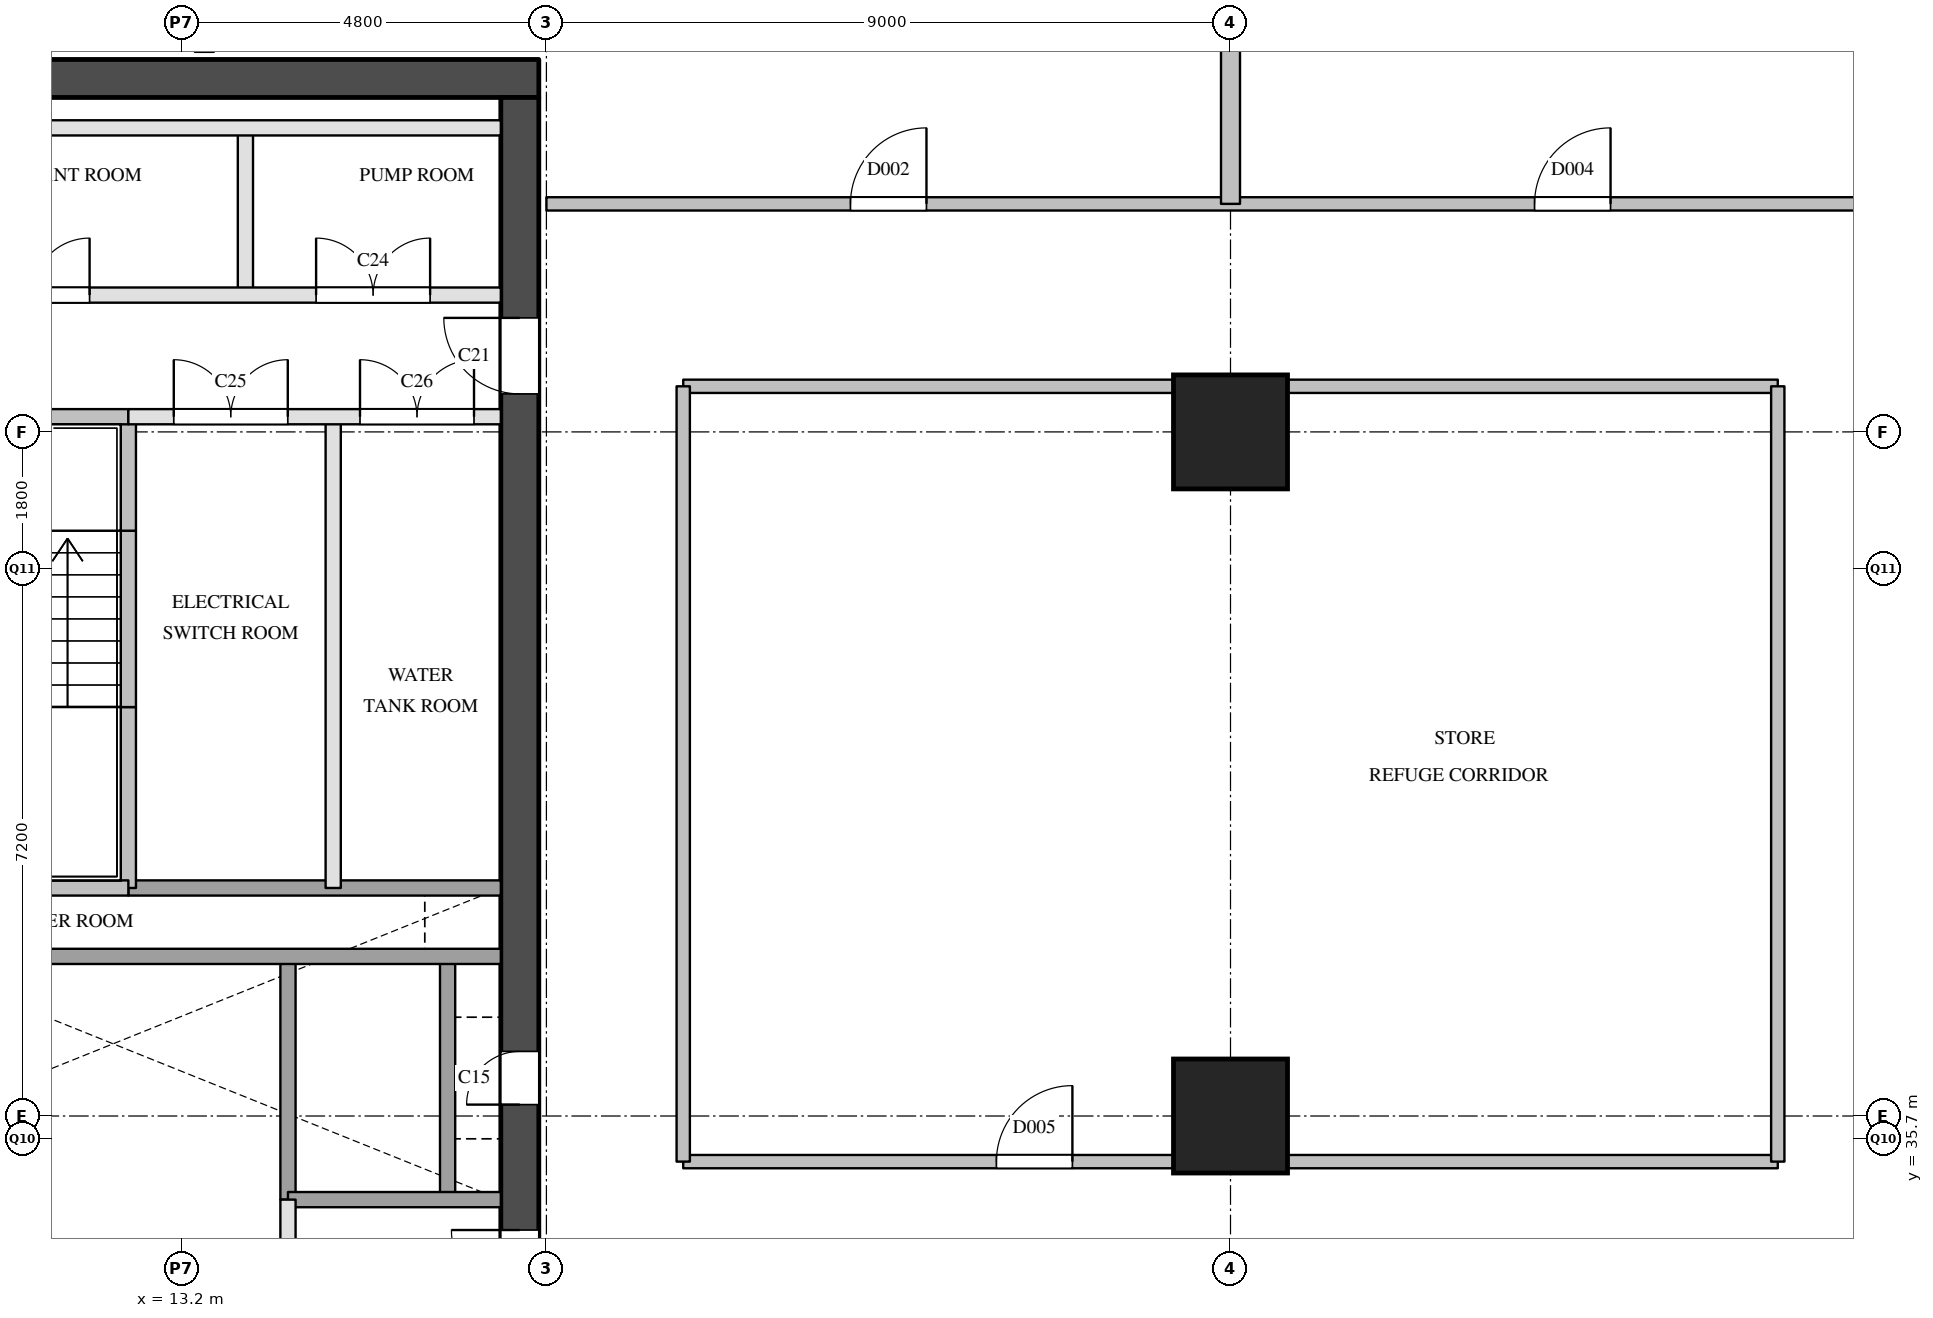
"""IFC4 building model, lengths in metres.
Left out: names, types, materials, properties, quantities, classifications, styles, units other than length and angle.
Written with IfcOpenShell. Run it as: python <this file> out.ifc"""

import sys

from ifc_helpers import new_model, si_unit, direction, frame, frame_2d, origin, origin_2d, place, context, subcontext, project, spatial, rectangle, extrude, element, fill, save


model = new_model("IFC4")
c1 = context("Model", 3, precision=1e-05, world=origin(), true_north=direction((0.0, 1.0)))
c2 = subcontext(c1, "Body", "Model", "MODEL_VIEW")
j1 = project(units=[si_unit("LENGTHUNIT", "METRE"), si_unit("PLANEANGLEUNIT", "RADIAN")], contexts=[c1])
p1 = place(None, origin())
s1 = spatial("IfcSite", under=j1, at=p1, CompositionType="ELEMENT")
p2 = place(p1, origin())
s2 = spatial("IfcBuilding", under=s1, at=p2, CompositionType="ELEMENT")
p3 = place(p2, frame((0.0, 0.0, 197.3)))
s3 = spatial("IfcBuildingStorey", under=s2, at=p3, CompositionType="ELEMENT", Elevation=197.3)
for number, where, z_axis, x_axis in (
    (1, (27.0, 36.0, 0.0), (0.0, 0.0, 1.0), (1.0, 0.0, 0.0)),
    (2, (27.0, 45.0, 0.0), (0.0, 0.0, 1.0), (1.0, 0.0, 0.0)),
):
    element("IfcColumn", number, at=place(p3, frame(where, z_axis=z_axis, x_axis=x_axis)), inside=s3, PredefinedType="COLUMN", context=c2, shape_type="SweptSolid", body=[
        extrude(rectangle(XDim=1.5, YDim=1.5, at=origin_2d()), origin(), (0.0, 0.0, 1.0), 6.0),
    ])
p4 = place(p3, frame((5.7, 49.65, 0.0), z_axis=(0.0, 0.0, 1.0), x_axis=(1.0, 0.0, 0.0)))
e3 = element("IfcWall", 3, at=p4, inside=s3, PredefinedType="SHEAR", context=c2, shape_type="SweptSolid", body=[
    extrude(rectangle(XDim=12.2, YDim=0.5, at=frame_2d((6.1, 0.0))), origin(), (0.0, 0.0, 1.0), 5.7),
])
p5 = place(p3, frame((17.65, 29.1, 0.0), z_axis=(0.0, 0.0, 1.0), x_axis=(0.0, 1.0, 0.0)))
e4 = element("IfcWall", 4, at=p5, inside=s3, PredefinedType="SHEAR", context=c2, shape_type="SweptSolid", body=[
    extrude(rectangle(XDim=20.3, YDim=0.5, at=frame_2d((10.15, 0.0))), origin(), (0.0, 0.0, 1.0), 5.7),
])
p6 = place(p5, frame((1.25, 0.0, 0.0)))
e5 = element("IfcOpeningElement", 5, at=p6, cuts=e4, PredefinedType="OPENING", context=c2, shape_type="SweptSolid", body=[
    extrude(rectangle(XDim=0.7, YDim=2.1, at=frame_2d((0.35, 1.05))), frame((0.0, 0.26, 0.0), z_axis=(0.0, -1.0, 0.0), x_axis=(1.0, 0.0, 0.0)), (0.0, 0.0, 1.0), 0.52),
])
p7 = place(p5, frame((7.05, 0.0, 0.0)))
e6 = element("IfcOpeningElement", 6, at=p7, cuts=e4, PredefinedType="OPENING", context=c2, shape_type="SweptSolid", body=[
    extrude(rectangle(XDim=0.7, YDim=2.1, at=frame_2d((0.35, 1.05))), frame((0.0, 0.26, 0.0), z_axis=(0.0, -1.0, 0.0), x_axis=(1.0, 0.0, 0.0)), (0.0, 0.0, 1.0), 0.52),
])
p8 = place(p5, frame((3.6, 0.0, 0.0)))
e7 = element("IfcOpeningElement", 7, at=p8, cuts=e4, PredefinedType="OPENING", context=c2, shape_type="SweptSolid", body=[
    extrude(rectangle(XDim=1.8, YDim=2.1, at=frame_2d((0.9, 1.05))), frame((0.0, 0.26, 0.0), z_axis=(0.0, -1.0, 0.0), x_axis=(1.0, 0.0, 0.0)), (0.0, 0.0, 1.0), 0.52),
])
p9 = place(p5, frame((16.4, 0.0, 0.0)))
e8 = element("IfcOpeningElement", 8, at=p9, cuts=e4, PredefinedType="OPENING", context=c2, shape_type="SweptSolid", body=[
    extrude(rectangle(XDim=1.0, YDim=2.1, at=frame_2d((0.5, 1.05))), frame((0.0, 0.26, 0.0), z_axis=(0.0, -1.0, 0.0), x_axis=(1.0, 0.0, 0.0)), (0.0, 0.0, 1.0), 0.52),
])
p10 = place(p3, frame((12.5, 39.0, 0.0), z_axis=(0.0, 0.0, 1.0), x_axis=(0.0, 1.0, 0.0)))
e9 = element("IfcWall", 9, at=p10, inside=s3, PredefinedType="SOLIDWALL", context=c2, shape_type="SweptSolid", body=[
    extrude(rectangle(XDim=2.38, YDim=0.2, at=frame_2d((1.19, 0.0))), origin(), (0.0, 0.0, 1.0), 5.7),
])
p11 = place(p3, frame((12.5, 41.38, 0.0), z_axis=(0.0, 0.0, 1.0), x_axis=(0.0, 1.0, 0.0)))
e10 = element("IfcWall", 10, at=p11, inside=s3, PredefinedType="SOLIDWALL", context=c2, shape_type="SweptSolid", body=[
    extrude(rectangle(XDim=2.32, YDim=0.2, at=frame_2d((1.16, 0.0))), origin(), (0.0, 0.0, 1.0), 5.7),
])
p12 = place(p3, frame((12.5, 43.7, 0.0), z_axis=(0.0, 0.0, 1.0), x_axis=(0.0, 1.0, 0.0)))
e11 = element("IfcWall", 11, at=p12, inside=s3, PredefinedType="SOLIDWALL", context=c2, shape_type="SweptSolid", body=[
    extrude(rectangle(XDim=1.5, YDim=0.2, at=frame_2d((0.75, 0.0))), origin(), (0.0, 0.0, 1.0), 5.7),
])
p13 = place(p3, frame((14.04, 46.8, 0.0), z_axis=(0.0, 0.0, 1.0), x_axis=(0.0, 1.0, 0.0)))
e12 = element("IfcWall", 12, at=p13, inside=s3, PredefinedType="PARTITIONING", context=c2, shape_type="SweptSolid", body=[
    extrude(rectangle(XDim=2.2, YDim=0.2, at=frame_2d((1.1, 0.0))), origin(), (0.0, 0.0, 1.0), 5.7),
])
p14 = place(p3, frame((14.6, 32.3, 0.0), z_axis=(0.0, 0.0, 1.0), x_axis=(0.0, 1.0, 0.0)))
e13 = element("IfcWall", 13, at=p14, inside=s3, PredefinedType="PARTITIONING", context=c2, shape_type="SweptSolid", body=[
    extrude(rectangle(XDim=2.6, YDim=0.2, at=frame_2d((1.3, 0.0))), origin(), (0.0, 0.0, 1.0), 5.7),
])
p15 = place(p14, frame((0.25, 0.0, 0.0)))
e14 = element("IfcOpeningElement", 14, at=p15, cuts=e13, PredefinedType="OPENING", context=c2, shape_type="SweptSolid", body=[
    extrude(rectangle(XDim=1.0, YDim=2.1, at=frame_2d((0.5, 1.05))), frame((0.0, 0.11, 0.0), z_axis=(0.0, -1.0, 0.0), x_axis=(1.0, 0.0, 0.0)), (0.0, 0.0, 1.0), 0.22),
])
p16 = place(p3, frame((14.6, 34.9, 0.0), z_axis=(0.0, 0.0, 1.0), x_axis=(0.0, 1.0, 0.0)))
e15 = element("IfcWall", 15, at=p16, inside=s3, PredefinedType="SOLIDWALL", context=c2, shape_type="SweptSolid", body=[
    extrude(rectangle(XDim=3.2, YDim=0.2, at=frame_2d((1.6, 0.0))), origin(), (0.0, 0.0, 1.0), 5.7),
])
p17 = place(p3, frame((15.195, 39.0, 0.0), z_axis=(0.0, 0.0, 1.0), x_axis=(0.0, 1.0, 0.0)))
e16 = element("IfcWall", 16, at=p17, inside=s3, PredefinedType="PARTITIONING", context=c2, shape_type="SweptSolid", body=[
    extrude(rectangle(XDim=6.2, YDim=0.2, at=frame_2d((3.1, 0.0))), origin(), (0.0, 0.0, 1.0), 5.7),
])
p18 = place(p3, frame((16.7, 34.9, 0.0), z_axis=(0.0, 0.0, 1.0), x_axis=(0.0, 1.0, 0.0)))
e17 = element("IfcWall", 17, at=p18, inside=s3, PredefinedType="SOLIDWALL", context=c2, shape_type="SweptSolid", body=[
    extrude(rectangle(XDim=3.2, YDim=0.2, at=frame_2d((1.6, 0.0))), origin(), (0.0, 0.0, 1.0), 5.7),
])
p19 = place(p3, frame((14.6, 34.9, 0.0), z_axis=(0.0, 0.0, 1.0), x_axis=(1.0, 0.0, 0.0)))
e18 = element("IfcWall", 18, at=p19, inside=s3, PredefinedType="SOLIDWALL", context=c2, shape_type="SweptSolid", body=[
    extrude(rectangle(XDim=2.8, YDim=0.2, at=frame_2d((1.4, 0.0))), origin(), (0.0, 0.0, 1.0), 5.7),
])
p20 = place(p3, frame((6.2, 38.1, 0.0), z_axis=(0.0, 0.0, 1.0), x_axis=(1.0, 0.0, 0.0)))
e19 = element("IfcWall", 19, at=p20, inside=s3, PredefinedType="SOLIDWALL", context=c2, shape_type="SweptSolid", body=[
    extrude(rectangle(XDim=11.2, YDim=0.2, at=frame_2d((5.6, 0.0))), origin(), (0.0, 0.0, 1.0), 5.7),
])
p21 = place(p3, frame((12.5, 39.0, 0.0), z_axis=(0.0, 0.0, 1.0), x_axis=(1.0, 0.0, 0.0)))
e20 = element("IfcWall", 20, at=p21, inside=s3, PredefinedType="SOLIDWALL", context=c2, shape_type="SweptSolid", body=[
    extrude(rectangle(XDim=4.9, YDim=0.2, at=frame_2d((2.45, 0.0))), origin(), (0.0, 0.0, 1.0), 5.7),
])
p22 = place(p3, frame((9.45, 39.0, 0.0), z_axis=(0.0, 0.0, 1.0), x_axis=(1.0, 0.0, 0.0)))
e21 = element("IfcWall", 21, at=p22, inside=s3, PredefinedType="SOLIDWALL", context=c2, shape_type="SweptSolid", body=[
    extrude(rectangle(XDim=3.05, YDim=0.2, at=frame_2d((1.525, 0.0))), origin(), (0.0, 0.0, 1.0), 5.7),
])
p23 = place(p3, frame((12.5, 45.2, 0.0), z_axis=(0.0, 0.0, 1.0), x_axis=(1.0, 0.0, 0.0)))
e22 = element("IfcWall", 22, at=p23, inside=s3, PredefinedType="PARTITIONING", context=c2, shape_type="SweptSolid", body=[
    extrude(rectangle(XDim=4.9, YDim=0.2, at=frame_2d((2.45, 0.0))), origin(), (0.0, 0.0, 1.0), 5.7),
])
p24 = place(p23, frame((0.597, 0.0, 0.0)))
e23 = element("IfcOpeningElement", 23, at=p24, cuts=e22, PredefinedType="OPENING", context=c2, shape_type="SweptSolid", body=[
    extrude(rectangle(XDim=1.5, YDim=2.1, at=frame_2d((0.75, 1.05))), frame((0.0, 0.11, 0.0), z_axis=(0.0, -1.0, 0.0), x_axis=(1.0, 0.0, 0.0)), (0.0, 0.0, 1.0), 0.22),
])
p25 = place(p23, frame((3.048, 0.0, 0.0)))
e24 = element("IfcOpeningElement", 24, at=p25, cuts=e22, PredefinedType="OPENING", context=c2, shape_type="SweptSolid", body=[
    extrude(rectangle(XDim=1.5, YDim=2.1, at=frame_2d((0.75, 1.05))), frame((0.0, 0.11, 0.0), z_axis=(0.0, -1.0, 0.0), x_axis=(1.0, 0.0, 0.0)), (0.0, 0.0, 1.0), 0.22),
])
p26 = place(p3, frame((9.45, 45.2, 0.0), z_axis=(0.0, 0.0, 1.0), x_axis=(1.0, 0.0, 0.0)))
e25 = element("IfcWall", 25, at=p26, inside=s3, PredefinedType="SOLIDWALL", context=c2, shape_type="SweptSolid", body=[
    extrude(rectangle(XDim=3.05, YDim=0.2, at=frame_2d((1.525, 0.0))), origin(), (0.0, 0.0, 1.0), 5.7),
])
p27 = place(p26, frame((0.925, 0.0, 0.0)))
e26 = element("IfcOpeningElement", 26, at=p27, cuts=e25, PredefinedType="OPENING", context=c2, shape_type="SweptSolid", body=[
    extrude(rectangle(XDim=1.1, YDim=2.1, at=frame_2d((0.55, 1.05))), frame((0.0, 0.11, 0.0), z_axis=(0.0, -1.0, 0.0), x_axis=(1.0, 0.0, 0.0)), (0.0, 0.0, 1.0), 0.22),
])
p28 = place(p3, frame((6.2, 46.8, 0.0), z_axis=(0.0, 0.0, 1.0), x_axis=(1.0, 0.0, 0.0)))
e27 = element("IfcWall", 27, at=p28, inside=s3, PredefinedType="PARTITIONING", context=c2, shape_type="SweptSolid", body=[
    extrude(rectangle(XDim=11.2, YDim=0.2, at=frame_2d((5.6, 0.0))), origin(), (0.0, 0.0, 1.0), 5.7),
])
p29 = place(p28, frame((0.37, 0.0, 0.0)))
e28 = element("IfcOpeningElement", 28, at=p29, cuts=e27, PredefinedType="OPENING", context=c2, shape_type="SweptSolid", body=[
    extrude(rectangle(XDim=1.5, YDim=2.1, at=frame_2d((0.75, 1.05))), frame((0.0, 0.11, 0.0), z_axis=(0.0, -1.0, 0.0), x_axis=(1.0, 0.0, 0.0)), (0.0, 0.0, 1.0), 0.22),
])
p30 = place(p28, frame((4.29, 0.0, 0.0)))
e29 = element("IfcOpeningElement", 29, at=p30, cuts=e27, PredefinedType="OPENING", context=c2, shape_type="SweptSolid", body=[
    extrude(rectangle(XDim=1.5, YDim=2.1, at=frame_2d((0.75, 1.05))), frame((0.0, 0.11, 0.0), z_axis=(0.0, -1.0, 0.0), x_axis=(1.0, 0.0, 0.0)), (0.0, 0.0, 1.0), 0.22),
])
p31 = place(p28, frame((8.77, 0.0, 0.0)))
e30 = element("IfcOpeningElement", 30, at=p31, cuts=e27, PredefinedType="OPENING", context=c2, shape_type="SweptSolid", body=[
    extrude(rectangle(XDim=1.5, YDim=2.1, at=frame_2d((0.75, 1.05))), frame((0.0, 0.11, 0.0), z_axis=(0.0, -1.0, 0.0), x_axis=(1.0, 0.0, 0.0)), (0.0, 0.0, 1.0), 0.22),
])
p32 = place(p3, frame((6.2, 49.0, 0.0), z_axis=(0.0, 0.0, 1.0), x_axis=(1.0, 0.0, 0.0)))
e31 = element("IfcWall", 31, at=p32, inside=s3, PredefinedType="PARTITIONING", context=c2, shape_type="SweptSolid", body=[
    extrude(rectangle(XDim=11.2, YDim=0.2, at=frame_2d((5.6, 0.0))), origin(), (0.0, 0.0, 1.0), 5.7),
])
p33 = place(p3, frame((19.8, 35.4, 0.0), z_axis=(0.0, 0.0, 1.0), x_axis=(1.0, 0.0, 0.0)))
e32 = element("IfcWall", 32, at=p33, inside=s3, PredefinedType="PARTITIONING", context=c2, shape_type="SweptSolid", body=[
    extrude(rectangle(XDim=14.4, YDim=0.175, at=frame_2d((7.2, 0.0))), origin(), (0.0, 0.0, 1.0), 5.7),
])
p34 = place(p33, frame((4.12, 0.0, 0.0)))
e33 = element("IfcOpeningElement", 33, at=p34, cuts=e32, PredefinedType="OPENING", context=c2, shape_type="SweptSolid", body=[
    extrude(rectangle(XDim=1.0, YDim=2.1, at=frame_2d((0.5, 1.05))), frame((0.0, 0.097, 0.0), z_axis=(0.0, -1.0, 0.0), x_axis=(1.0, 0.0, 0.0)), (0.0, 0.0, 1.0), 0.195),
])
p35 = place(p3, frame((19.8, 45.6, 0.0), z_axis=(0.0, 0.0, 1.0), x_axis=(1.0, 0.0, 0.0)))
e34 = element("IfcWall", 34, at=p35, inside=s3, PredefinedType="PARTITIONING", context=c2, shape_type="SweptSolid", body=[
    extrude(rectangle(XDim=14.4, YDim=0.175, at=frame_2d((7.2, 0.0))), origin(), (0.0, 0.0, 1.0), 5.7),
])
p36 = place(p3, frame((18.0, 48.0, 0.0), z_axis=(0.0, 0.0, 1.0), x_axis=(1.0, 0.0, 0.0)))
e35 = element("IfcWall", 35, at=p36, inside=s3, PredefinedType="PARTITIONING", context=c2, shape_type="SweptSolid", body=[
    extrude(rectangle(XDim=18.0, YDim=0.175, at=frame_2d((9.0, 0.0))), origin(), (0.0, 0.0, 1.0), 5.7),
])
p37 = place(p36, frame((4.0, 0.0, 0.0)))
e36 = element("IfcOpeningElement", 36, at=p37, cuts=e35, PredefinedType="OPENING", context=c2, shape_type="SweptSolid", body=[
    extrude(rectangle(XDim=1.0, YDim=2.1, at=frame_2d((0.5, 1.05))), frame((0.0, 0.097, 0.0), z_axis=(0.0, -1.0, 0.0), x_axis=(1.0, 0.0, 0.0)), (0.0, 0.0, 1.0), 0.195),
])
p38 = place(p36, frame((13.0, 0.0, 0.0)))
e37 = element("IfcOpeningElement", 37, at=p38, cuts=e35, PredefinedType="OPENING", context=c2, shape_type="SweptSolid", body=[
    extrude(rectangle(XDim=1.0, YDim=2.1, at=frame_2d((0.5, 1.05))), frame((0.0, 0.097, 0.0), z_axis=(0.0, -1.0, 0.0), x_axis=(1.0, 0.0, 0.0)), (0.0, 0.0, 1.0), 0.195),
])
for number, where, z_axis, x_axis in (
    (38, (19.8, 35.4, 0.0), (0.0, 0.0, 1.0), (0.0, 1.0, 0.0)),
    (39, (34.2, 35.4, 0.0), (0.0, 0.0, 1.0), (0.0, 1.0, 0.0)),
):
    element("IfcWall", number, at=place(p3, frame(where, z_axis=z_axis, x_axis=x_axis)), inside=s3, PredefinedType="PARTITIONING", context=c2, shape_type="SweptSolid", body=[
        extrude(rectangle(XDim=10.2, YDim=0.175, at=frame_2d((5.1, 0.0))), origin(), (0.0, 0.0, 1.0), 4.59),
    ])
p39 = place(p3, frame((27.0, 48.0, 0.0), z_axis=(0.0, 0.0, 1.0), x_axis=(0.0, 1.0, 0.0)))
e40 = element("IfcWall", 40, at=p39, inside=s3, PredefinedType="PARTITIONING", context=c2, shape_type="SweptSolid", body=[
    extrude(rectangle(XDim=6.0, YDim=0.25, at=frame_2d((3.0, 0.0))), origin(), (0.0, 0.0, 1.0), 5.7),
])
p40 = place(p7, origin())
e41 = element("IfcDoor", 41, at=p40, inside=s3, OperationType="SINGLE_SWING_LEFT", PredefinedType="DOOR", context=c2, shape_type="SweptSolid", body=[
    extrude(rectangle(XDim=0.7, YDim=2.1, at=frame_2d((0.35, 1.05))), frame((0.0, 0.025, 0.0), z_axis=(0.0, -1.0, 0.0), x_axis=(1.0, 0.0, 0.0)), (0.0, 0.0, 1.0), 0.05),
])
fill(e6, e41)
p41 = place(p8, origin())
e42 = element("IfcDoor", 42, at=p41, inside=s3, OperationType="DOUBLE_DOOR_SINGLE_SWING", PredefinedType="DOOR", context=c2, shape_type="SweptSolid", body=[
    extrude(rectangle(XDim=1.8, YDim=2.1, at=frame_2d((0.9, 1.05))), frame((0.0, 0.025, 0.0), z_axis=(0.0, -1.0, 0.0), x_axis=(1.0, 0.0, 0.0)), (0.0, 0.0, 1.0), 0.05),
])
fill(e7, e42)
p42 = place(p9, origin())
e43 = element("IfcDoor", 43, at=p42, inside=s3, OperationType="SINGLE_SWING_RIGHT", PredefinedType="DOOR", context=c2, shape_type="SweptSolid", body=[
    extrude(rectangle(XDim=1.0, YDim=2.1, at=frame_2d((0.5, 1.05))), frame((0.0, 0.025, 0.0), z_axis=(0.0, -1.0, 0.0), x_axis=(1.0, 0.0, 0.0)), (0.0, 0.0, 1.0), 0.05),
])
fill(e8, e43)
p43 = place(p30, origin())
e44 = element("IfcDoor", 44, at=p43, inside=s3, OperationType="DOUBLE_DOOR_SINGLE_SWING", PredefinedType="DOOR", context=c2, shape_type="SweptSolid", body=[
    extrude(rectangle(XDim=1.5, YDim=2.1, at=frame_2d((0.75, 1.05))), frame((0.0, 0.025, 0.0), z_axis=(0.0, -1.0, 0.0), x_axis=(1.0, 0.0, 0.0)), (0.0, 0.0, 1.0), 0.05),
])
fill(e29, e44)
p44 = place(p31, origin())
e45 = element("IfcDoor", 45, at=p44, inside=s3, OperationType="DOUBLE_DOOR_SINGLE_SWING", PredefinedType="DOOR", context=c2, shape_type="SweptSolid", body=[
    extrude(rectangle(XDim=1.5, YDim=2.1, at=frame_2d((0.75, 1.05))), frame((0.0, 0.025, 0.0), z_axis=(0.0, -1.0, 0.0), x_axis=(1.0, 0.0, 0.0)), (0.0, 0.0, 1.0), 0.05),
])
fill(e30, e45)
p45 = place(p24, origin())
e46 = element("IfcDoor", 46, at=p45, inside=s3, OperationType="DOUBLE_DOOR_SINGLE_SWING", PredefinedType="DOOR", context=c2, shape_type="SweptSolid", body=[
    extrude(rectangle(XDim=1.5, YDim=2.1, at=frame_2d((0.75, 1.05))), frame((0.0, 0.025, 0.0), z_axis=(0.0, -1.0, 0.0), x_axis=(1.0, 0.0, 0.0)), (0.0, 0.0, 1.0), 0.05),
])
fill(e23, e46)
p46 = place(p25, origin())
e47 = element("IfcDoor", 47, at=p46, inside=s3, OperationType="DOUBLE_DOOR_SINGLE_SWING", PredefinedType="DOOR", context=c2, shape_type="SweptSolid", body=[
    extrude(rectangle(XDim=1.5, YDim=2.1, at=frame_2d((0.75, 1.05))), frame((0.0, 0.025, 0.0), z_axis=(0.0, -1.0, 0.0), x_axis=(1.0, 0.0, 0.0)), (0.0, 0.0, 1.0), 0.05),
])
fill(e24, e47)
p47 = place(p37, origin())
e48 = element("IfcDoor", 48, at=p47, inside=s3, OperationType="SINGLE_SWING_RIGHT", PredefinedType="DOOR", context=c2, shape_type="SweptSolid", body=[
    extrude(rectangle(XDim=1.0, YDim=2.1, at=frame_2d((0.5, 1.05))), frame((0.0, 0.025, 0.0), z_axis=(0.0, -1.0, 0.0), x_axis=(1.0, 0.0, 0.0)), (0.0, 0.0, 1.0), 0.05),
])
fill(e36, e48)
p48 = place(p38, origin())
e49 = element("IfcDoor", 49, at=p48, inside=s3, OperationType="SINGLE_SWING_RIGHT", PredefinedType="DOOR", context=c2, shape_type="SweptSolid", body=[
    extrude(rectangle(XDim=1.0, YDim=2.1, at=frame_2d((0.5, 1.05))), frame((0.0, 0.025, 0.0), z_axis=(0.0, -1.0, 0.0), x_axis=(1.0, 0.0, 0.0)), (0.0, 0.0, 1.0), 0.05),
])
fill(e37, e49)
p49 = place(p34, origin())
e50 = element("IfcDoor", 50, at=p49, inside=s3, OperationType="SINGLE_SWING_RIGHT", PredefinedType="DOOR", context=c2, shape_type="SweptSolid", body=[
    extrude(rectangle(XDim=1.0, YDim=2.1, at=frame_2d((0.5, 1.05))), frame((0.0, 0.025, 0.0), z_axis=(0.0, -1.0, 0.0), x_axis=(1.0, 0.0, 0.0)), (0.0, 0.0, 1.0), 0.05),
])
fill(e33, e50)
save(model, sys.argv[1])
